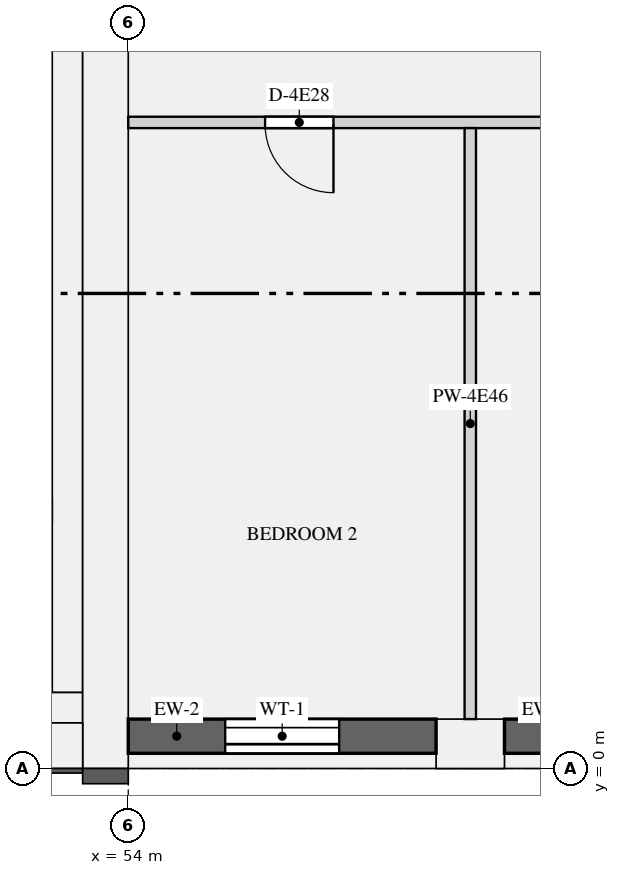
"""IFC4 building model, lengths in metres.
Left out: names, types, materials, properties, quantities, classifications, styles, units other than length and angle.
Written with IfcOpenShell. Run it as: python <this file> out.ifc"""

import sys

from ifc_helpers import new_model, si_unit, direction, frame, frame_2d, origin, origin_2d, place, context, subcontext, project, spatial, rectangle, extrude, element, fill, save


model = new_model("IFC4")
c1 = context("Model", 3, precision=1e-05, world=origin(), true_north=direction((0.0, 1.0)))
c2 = subcontext(c1, "Body", "Model", "MODEL_VIEW")
j1 = project(units=[si_unit("LENGTHUNIT", "METRE"), si_unit("PLANEANGLEUNIT", "RADIAN")], contexts=[c1])
p1 = place(None, origin())
s1 = spatial("IfcSite", under=j1, at=p1, CompositionType="ELEMENT")
p2 = place(p1, origin())
s2 = spatial("IfcBuilding", under=s1, at=p2, CompositionType="ELEMENT")
p3 = place(p2, frame((0.0, 0.0, 232.65)))
s3 = spatial("IfcBuildingStorey", under=s2, at=p3, CompositionType="ELEMENT", Elevation=232.65)
p4 = place(p3, frame((58.5, 0.325, 0.0), z_axis=(0.0, 0.0, 1.0), x_axis=(1.0, 0.0, 0.0)))
e1 = element("IfcColumn", 1, at=p4, inside=s3, PredefinedType="USERDEFINED", context=c2, shape_type="SweptSolid", body=[
    extrude(rectangle(XDim=0.9, YDim=0.65, at=origin_2d()), origin(), (0.0, 0.0, 1.0), 3.15),
])
p5 = place(p3, frame((53.7, 0.0, 0.0), z_axis=(0.0, 0.0, 1.0), x_axis=(0.0, 1.0, 0.0)))
e2 = element("IfcWall", 2, at=p5, inside=s3, PredefinedType="SHEAR", context=c2, shape_type="SweptSolid", body=[
    extrude(rectangle(XDim=12.5, YDim=0.6, at=frame_2d((6.25, 0.0))), origin(), (0.0, 0.0, 1.0), 3.15),
])
p6 = place(p3, frame((18.6, 0.3, 0.0), z_axis=(0.0, 0.0, 1.0), x_axis=(1.0, 0.0, 0.0)))
e3 = element("IfcWall", 3, at=p6, inside=s3, PredefinedType="SHEAR", context=c2, shape_type="SweptSolid", body=[
    extrude(rectangle(XDim=34.8, YDim=0.6, at=frame_2d((17.4, 0.0))), origin(), (0.0, 0.0, 1.0), 3.15),
])
p7 = place(p3, frame((53.2, 1.0, 0.0), z_axis=(0.0, 0.0, 1.0), x_axis=(0.0, 1.0, 0.0)))
e4 = element("IfcWall", 4, at=p7, inside=s3, PredefinedType="SHEAR", context=c2, shape_type="SweptSolid", body=[
    extrude(rectangle(XDim=10.9, YDim=0.4, at=frame_2d((5.45, 0.0))), origin(), (0.0, 0.0, 1.0), 3.15),
])
p8 = place(p3, frame((18.6, 0.8, 0.0), z_axis=(0.0, 0.0, 1.0), x_axis=(1.0, 0.0, 0.0)))
e5 = element("IfcWall", 5, at=p8, inside=s3, PredefinedType="SHEAR", context=c2, shape_type="SweptSolid", body=[
    extrude(rectangle(XDim=34.8, YDim=0.4, at=frame_2d((17.4, 0.0))), origin(), (0.0, 0.0, 1.0), 3.15),
])
p9 = place(p3, frame((54.0, 0.425, 0.9), z_axis=(0.0, 0.0, 1.0), x_axis=(1.0, 0.0, 0.0)))
e6 = element("IfcWall", 6, at=p9, inside=s3, PredefinedType="SOLIDWALL", context=c2, shape_type="SweptSolid", body=[
    extrude(rectangle(XDim=4.05, YDim=0.45, at=frame_2d((2.025, 0.0))), origin(), (0.0, 0.0, 1.0), 1.9),
])
p10 = place(p9, frame((1.275, 0.0, 0.15)))
e7 = element("IfcOpeningElement", 7, at=p10, cuts=e6, PredefinedType="OPENING", context=c2, shape_type="SweptSolid", body=[
    extrude(rectangle(XDim=1.5, YDim=1.5, at=frame_2d((0.75, 0.75))), frame((0.0, 0.235, 0.0), z_axis=(0.0, -1.0, 0.0), x_axis=(1.0, 0.0, 0.0)), (0.0, 0.0, 1.0), 0.47),
])
p11 = place(p3, frame((58.95, 0.425, 0.9), z_axis=(0.0, 0.0, 1.0), x_axis=(1.0, 0.0, 0.0)))
e8 = element("IfcWall", 8, at=p11, inside=s3, PredefinedType="SOLIDWALL", context=c2, shape_type="SweptSolid", body=[
    extrude(rectangle(XDim=3.6, YDim=0.45, at=frame_2d((1.8, 0.0))), origin(), (0.0, 0.0, 1.0), 1.9),
])
p12 = place(p11, frame((1.05, 0.0, 0.15)))
e9 = element("IfcOpeningElement", 9, at=p12, cuts=e8, PredefinedType="OPENING", context=c2, shape_type="SweptSolid", body=[
    extrude(rectangle(XDim=1.5, YDim=1.5, at=frame_2d((0.75, 0.75))), frame((0.0, 0.235, 0.0), z_axis=(0.0, -1.0, 0.0), x_axis=(1.0, 0.0, 0.0)), (0.0, 0.0, 1.0), 0.47),
])
p13 = place(p3, frame((54.0, 8.5, 0.0), z_axis=(0.0, 0.0, 1.0), x_axis=(1.0, 0.0, 0.0)))
e10 = element("IfcWall", 10, at=p13, inside=s3, PredefinedType="PARTITIONING", context=c2, shape_type="SweptSolid", body=[
    extrude(rectangle(XDim=17.35, YDim=0.15, at=frame_2d((8.675, 0.0))), origin(), (0.0, 0.0, 1.0), 2.8),
])
p14 = place(p13, frame((1.8, 0.0, 0.0)))
e11 = element("IfcOpeningElement", 11, at=p14, cuts=e10, PredefinedType="OPENING", context=c2, shape_type="SweptSolid", body=[
    extrude(rectangle(XDim=0.9, YDim=2.1, at=frame_2d((0.45, 1.05))), frame((0.0, 0.085, 0.0), z_axis=(0.0, -1.0, 0.0), x_axis=(1.0, 0.0, 0.0)), (0.0, 0.0, 1.0), 0.17),
])
p15 = place(p13, frame((6.3, 0.0, 0.0)))
e12 = element("IfcOpeningElement", 12, at=p15, cuts=e10, PredefinedType="OPENING", context=c2, shape_type="SweptSolid", body=[
    extrude(rectangle(XDim=0.9, YDim=2.1, at=frame_2d((0.45, 1.05))), frame((0.0, 0.085, 0.0), z_axis=(0.0, -1.0, 0.0), x_axis=(1.0, 0.0, 0.0)), (0.0, 0.0, 1.0), 0.17),
])
p16 = place(p13, frame((12.8, 0.0, 0.0)))
e13 = element("IfcOpeningElement", 13, at=p16, cuts=e10, PredefinedType="OPENING", context=c2, shape_type="SweptSolid", body=[
    extrude(rectangle(XDim=0.9, YDim=2.1, at=frame_2d((0.45, 1.05))), frame((0.0, 0.085, 0.0), z_axis=(0.0, -1.0, 0.0), x_axis=(1.0, 0.0, 0.0)), (0.0, 0.0, 1.0), 0.17),
])
p17 = place(p3, frame((58.5, 0.65, 0.0), z_axis=(0.0, 0.0, 1.0), x_axis=(0.0, 1.0, 0.0)))
e14 = element("IfcWall", 14, at=p17, inside=s3, PredefinedType="PARTITIONING", context=c2, shape_type="SweptSolid", body=[
    extrude(rectangle(XDim=7.775, YDim=0.15, at=frame_2d((3.888, 0.0))), origin(), (0.0, 0.0, 1.0), 2.8),
])
p18 = place(p10, origin())
e15 = element("IfcWindow", 15, at=p18, inside=s3, PartitioningType="SINGLE_PANEL", PredefinedType="WINDOW", context=c2, shape_type="SweptSolid", body=[
    extrude(rectangle(XDim=1.5, YDim=1.5, at=frame_2d((0.75, 0.75))), frame((0.0, -0.065, 0.0), z_axis=(0.0, -1.0, 0.0), x_axis=(1.0, 0.0, 0.0)), (0.0, 0.0, 1.0), 0.06),
])
fill(e7, e15)
p19 = place(p14, frame((0.9, 0.0, 0.0), z_axis=(0.0, 0.0, 1.0), x_axis=(-1.0, 0.0, 0.0)))
e16 = element("IfcDoor", 16, at=p19, inside=s3, OperationType="SINGLE_SWING_LEFT", PredefinedType="DOOR", context=c2, shape_type="SweptSolid", body=[
    extrude(rectangle(XDim=0.9, YDim=2.1, at=frame_2d((0.45, 1.05))), frame((0.0, 0.025, 0.0), z_axis=(0.0, -1.0, 0.0), x_axis=(1.0, 0.0, 0.0)), (0.0, 0.0, 1.0), 0.05),
])
fill(e11, e16)
save(model, sys.argv[1])
